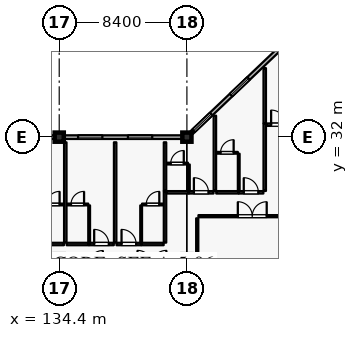
"""IFC4 building model, lengths in metres.
Left out: names, types, materials, properties, quantities, classifications, styles, units other than length and angle.
Written with IfcOpenShell. Run it as: python <this file> out.ifc"""

import sys

from ifc_helpers import new_model, si_unit, direction, frame, frame_2d, origin, origin_2d, place, context, subcontext, project, spatial, rectangle, extrude, element, fill, save


model = new_model("IFC4")
c1 = context("Model", 3, precision=1e-05, world=origin(), true_north=direction((0.0, 1.0)))
c2 = subcontext(c1, "Body", "Model", "MODEL_VIEW")
j1 = project(units=[si_unit("LENGTHUNIT", "METRE"), si_unit("PLANEANGLEUNIT", "RADIAN")], contexts=[c1])
p1 = place(None, origin())
s1 = spatial("IfcSite", under=j1, at=p1, CompositionType="ELEMENT")
p2 = place(p1, origin())
s2 = spatial("IfcBuilding", under=s1, at=p2, CompositionType="ELEMENT")
p3 = place(p2, frame((0.0, 0.0, 39.6)))
s3 = spatial("IfcBuildingStorey", under=s2, at=p3, CompositionType="ELEMENT", Elevation=39.6)
for number, where, z_axis, x_axis in (
    (1, (134.4, 32.0, 0.0), (0.0, 0.0, 1.0), (1.0, 0.0, 0.0)),
    (2, (142.8, 32.0, 0.0), (0.0, 0.0, 1.0), (1.0, 0.0, 0.0)),
    (3, (134.4, 24.0, 0.0), (0.0, 0.0, 1.0), (1.0, 0.0, 0.0)),
    (4, (142.8, 24.0, 0.0), (0.0, 0.0, 1.0), (1.0, 0.0, 0.0)),
):
    element("IfcColumn", number, at=place(p3, frame(where, z_axis=z_axis, x_axis=x_axis)), inside=s3, PredefinedType="COLUMN", context=c2, shape_type="SweptSolid", body=[
        extrude(rectangle(XDim=0.6, YDim=0.6, at=origin_2d()), origin(), (0.0, 0.0, 1.0), 3.6),
    ])
p4 = place(p3, frame((126.3, 32.0, 0.0), z_axis=(0.0, 0.0, 1.0), x_axis=(1.0, 0.0, 0.0)))
e5 = element("IfcWall", 5, at=p4, inside=s3, PredefinedType="SOLIDWALL", context=c2, shape_type="SweptSolid", body=[
    extrude(rectangle(XDim=7.8, YDim=0.24, at=frame_2d((3.9, 0.0))), origin(), (0.0, 0.0, 1.0), 2.89),
])
p5 = place(p4, frame((0.12, 0.0, 0.8)))
e6 = element("IfcOpeningElement", 6, at=p5, cuts=e5, PredefinedType="OPENING", context=c2, shape_type="SweptSolid", body=[
    extrude(rectangle(XDim=1.6, YDim=1.6, at=frame_2d((0.8, 0.8))), frame((0.0, 0.13, 0.0), z_axis=(0.0, -1.0, 0.0), x_axis=(1.0, 0.0, 0.0)), (0.0, 0.0, 1.0), 0.26),
])
p6 = place(p4, frame((2.78, 0.0, 0.8)))
e7 = element("IfcOpeningElement", 7, at=p6, cuts=e5, PredefinedType="OPENING", context=c2, shape_type="SweptSolid", body=[
    extrude(rectangle(XDim=1.6, YDim=1.6, at=frame_2d((0.8, 0.8))), frame((0.0, 0.13, 0.0), z_axis=(0.0, -1.0, 0.0), x_axis=(1.0, 0.0, 0.0)), (0.0, 0.0, 1.0), 0.26),
])
p7 = place(p4, frame((5.76, 0.0, 0.8)))
e8 = element("IfcOpeningElement", 8, at=p7, cuts=e5, PredefinedType="OPENING", context=c2, shape_type="SweptSolid", body=[
    extrude(rectangle(XDim=1.6, YDim=1.6, at=frame_2d((0.8, 0.8))), frame((0.0, 0.13, 0.0), z_axis=(0.0, -1.0, 0.0), x_axis=(1.0, 0.0, 0.0)), (0.0, 0.0, 1.0), 0.26),
])
p8 = place(p3, frame((134.7, 32.0, 0.0), z_axis=(0.0, 0.0, 1.0), x_axis=(1.0, 0.0, 0.0)))
e9 = element("IfcWall", 9, at=p8, inside=s3, PredefinedType="SOLIDWALL", context=c2, shape_type="SweptSolid", body=[
    extrude(rectangle(XDim=7.8, YDim=0.24, at=frame_2d((3.9, 0.0))), origin(), (0.0, 0.0, 1.0), 2.94),
])
p9 = place(p8, frame((0.94, 0.0, 0.8)))
e10 = element("IfcOpeningElement", 10, at=p9, cuts=e9, PredefinedType="OPENING", context=c2, shape_type="SweptSolid", body=[
    extrude(rectangle(XDim=1.6, YDim=1.6, at=frame_2d((0.8, 0.8))), frame((0.0, 0.13, 0.0), z_axis=(0.0, -1.0, 0.0), x_axis=(1.0, 0.0, 0.0)), (0.0, 0.0, 1.0), 0.26),
])
p10 = place(p8, frame((4.22, 0.0, 0.8)))
e11 = element("IfcOpeningElement", 11, at=p10, cuts=e9, PredefinedType="OPENING", context=c2, shape_type="SweptSolid", body=[
    extrude(rectangle(XDim=1.6, YDim=1.6, at=frame_2d((0.8, 0.8))), frame((0.0, 0.13, 0.0), z_axis=(0.0, -1.0, 0.0), x_axis=(1.0, 0.0, 0.0)), (0.0, 0.0, 1.0), 0.26),
])
p11 = place(p3, frame((143.1, 32.286, 0.0), z_axis=(0.0, 0.0, 1.0), x_axis=(0.724145477467, 0.689647248573, 0.0)))
e12 = element("IfcWall", 12, at=p11, inside=s3, PredefinedType="SOLIDWALL", context=c2, shape_type="SweptSolid", body=[
    extrude(rectangle(XDim=10.771, YDim=0.24, at=frame_2d((5.385, 0.0))), origin(), (0.0, 0.0, 1.0), 2.94),
])
p12 = place(p11, frame((0.194, 0.0, 0.8)))
e13 = element("IfcOpeningElement", 13, at=p12, cuts=e12, PredefinedType="OPENING", context=c2, shape_type="SweptSolid", body=[
    extrude(rectangle(XDim=1.6, YDim=1.6, at=frame_2d((0.8, 0.8))), frame((0.0, 0.13, 0.0), z_axis=(0.0, -1.0, 0.0), x_axis=(1.0, 0.0, 0.0)), (0.0, 0.0, 1.0), 0.26),
])
p13 = place(p11, frame((3.591, 0.0, 0.8)))
e14 = element("IfcOpeningElement", 14, at=p13, cuts=e12, PredefinedType="OPENING", context=c2, shape_type="SweptSolid", body=[
    extrude(rectangle(XDim=1.6, YDim=1.6, at=frame_2d((0.8, 0.8))), frame((0.0, 0.13, 0.0), z_axis=(0.0, -1.0, 0.0), x_axis=(1.0, 0.0, 0.0)), (0.0, 0.0, 1.0), 0.26),
])
p14 = place(p11, frame((7.983, 0.0, 0.8)))
e15 = element("IfcOpeningElement", 15, at=p14, cuts=e12, PredefinedType="OPENING", context=c2, shape_type="SweptSolid", body=[
    extrude(rectangle(XDim=1.6, YDim=1.6, at=frame_2d((0.8, 0.8))), frame((0.0, 0.13, 0.0), z_axis=(0.0, -1.0, 0.0), x_axis=(1.0, 0.0, 0.0)), (0.0, 0.0, 1.0), 0.26),
])
p15 = place(p3, frame((133.24, 24.97, 0.0), z_axis=(0.0, 0.0, 1.0), x_axis=(1.0, 0.0, 0.0)))
e16 = element("IfcWall", 16, at=p15, inside=s3, PredefinedType="PARTITIONING", context=c2, shape_type="SweptSolid", body=[
    extrude(rectangle(XDim=1.47, YDim=0.16, at=frame_2d((0.735, 0.0))), origin(), (0.0, 0.0, 1.0), 3.335),
])
p16 = place(p3, frame((133.29, 27.57, 0.0), z_axis=(0.0, 0.0, 1.0), x_axis=(1.0, 0.0, 0.0)))
e17 = element("IfcWall", 17, at=p16, inside=s3, PredefinedType="PARTITIONING", context=c2, shape_type="SweptSolid", body=[
    extrude(rectangle(XDim=1.41, YDim=0.115, at=frame_2d((0.705, 0.0))), origin(), (0.0, 0.0, 1.0), 3.335),
])
p17 = place(p16, frame((0.275, 0.0, 0.0)))
e18 = element("IfcOpeningElement", 18, at=p17, cuts=e17, PredefinedType="OPENING", context=c2, shape_type="SweptSolid", body=[
    extrude(rectangle(XDim=0.86, YDim=2.12, at=frame_2d((0.43, 1.06))), frame((0.0, 0.067, 0.0), z_axis=(0.0, -1.0, 0.0), x_axis=(1.0, 0.0, 0.0)), (0.0, 0.0, 1.0), 0.135),
])
p18 = place(p3, frame((134.89, 24.97, 0.0), z_axis=(0.0, 0.0, 1.0), x_axis=(1.0, 0.0, 0.0)))
e19 = element("IfcWall", 19, at=p18, inside=s3, PredefinedType="PARTITIONING", context=c2, shape_type="SweptSolid", body=[
    extrude(rectangle(XDim=1.47, YDim=0.16, at=frame_2d((0.735, 0.0))), origin(), (0.0, 0.0, 1.0), 3.335),
])
p19 = place(p3, frame((136.37, 24.97, 0.0), z_axis=(0.0, 0.0, 1.0), x_axis=(1.0, 0.0, 0.0)))
e20 = element("IfcWall", 20, at=p19, inside=s3, PredefinedType="PARTITIONING", context=c2, shape_type="SweptSolid", body=[
    extrude(rectangle(XDim=1.62, YDim=0.16, at=frame_2d((0.81, 0.0))), origin(), (0.0, 0.0, 1.0), 3.335),
])
p20 = place(p19, frame((0.33, 0.0, 0.0)))
e21 = element("IfcOpeningElement", 21, at=p20, cuts=e20, PredefinedType="OPENING", context=c2, shape_type="SweptSolid", body=[
    extrude(rectangle(XDim=0.96, YDim=2.2, at=frame_2d((0.48, 1.1))), frame((0.0, 0.09, 0.0), z_axis=(0.0, -1.0, 0.0), x_axis=(1.0, 0.0, 0.0)), (0.0, 0.0, 1.0), 0.18),
])
p21 = place(p3, frame((136.37, 25.06, 0.0), z_axis=(0.0, 0.0, 1.0), x_axis=(0.0, 1.0, 0.0)))
e22 = element("IfcWall", 22, at=p21, inside=s3, PredefinedType="PARTITIONING", context=c2, shape_type="SweptSolid", body=[
    extrude(rectangle(XDim=2.45, YDim=0.115, at=frame_2d((1.225, 0.0))), origin(), (0.0, 0.0, 1.0), 3.335),
])
p22 = place(p3, frame((134.9, 27.57, 0.0), z_axis=(0.0, 0.0, 1.0), x_axis=(1.0, 0.0, 0.0)))
e23 = element("IfcWall", 23, at=p22, inside=s3, PredefinedType="PARTITIONING", context=c2, shape_type="SweptSolid", body=[
    extrude(rectangle(XDim=1.41, YDim=0.115, at=frame_2d((0.705, 0.0))), origin(), (0.0, 0.0, 1.0), 3.335),
])
p23 = place(p22, frame((0.275, 0.0, 0.0)))
e24 = element("IfcOpeningElement", 24, at=p23, cuts=e23, PredefinedType="OPENING", context=c2, shape_type="SweptSolid", body=[
    extrude(rectangle(XDim=0.86, YDim=2.12, at=frame_2d((0.43, 1.06))), frame((0.0, 0.067, 0.0), z_axis=(0.0, -1.0, 0.0), x_axis=(1.0, 0.0, 0.0)), (0.0, 0.0, 1.0), 0.135),
])
p24 = place(p3, frame((134.8, 25.06, 0.0), z_axis=(0.0, 0.0, 1.0), x_axis=(0.0, 1.0, 0.0)))
e25 = element("IfcWall", 25, at=p24, inside=s3, PredefinedType="PARTITIONING", context=c2, shape_type="SweptSolid", body=[
    extrude(rectangle(XDim=6.6, YDim=0.16, at=frame_2d((3.3, 0.0))), origin(), (0.0, 0.0, 1.0), 3.335),
])
p25 = place(p3, frame((138.17, 24.97, 0.0), z_axis=(0.0, 0.0, 1.0), x_axis=(1.0, 0.0, 0.0)))
e26 = element("IfcWall", 26, at=p25, inside=s3, PredefinedType="PARTITIONING", context=c2, shape_type="SweptSolid", body=[
    extrude(rectangle(XDim=1.62, YDim=0.16, at=frame_2d((0.81, 0.0))), origin(), (0.0, 0.0, 1.0), 3.335),
])
p26 = place(p25, frame((0.33, 0.0, 0.0)))
e27 = element("IfcOpeningElement", 27, at=p26, cuts=e26, PredefinedType="OPENING", context=c2, shape_type="SweptSolid", body=[
    extrude(rectangle(XDim=0.96, YDim=2.2, at=frame_2d((0.48, 1.1))), frame((0.0, 0.09, 0.0), z_axis=(0.0, -1.0, 0.0), x_axis=(1.0, 0.0, 0.0)), (0.0, 0.0, 1.0), 0.18),
])
p27 = place(p3, frame((139.8, 24.97, 0.0), z_axis=(0.0, 0.0, 1.0), x_axis=(1.0, 0.0, 0.0)))
e28 = element("IfcWall", 28, at=p27, inside=s3, PredefinedType="PARTITIONING", context=c2, shape_type="SweptSolid", body=[
    extrude(rectangle(XDim=1.47, YDim=0.16, at=frame_2d((0.735, 0.0))), origin(), (0.0, 0.0, 1.0), 3.335),
])
p28 = place(p3, frame((139.79, 25.06, 0.0), z_axis=(0.0, 0.0, 1.0), x_axis=(0.0, 1.0, 0.0)))
e29 = element("IfcWall", 29, at=p28, inside=s3, PredefinedType="PARTITIONING", context=c2, shape_type="SweptSolid", body=[
    extrude(rectangle(XDim=2.45, YDim=0.115, at=frame_2d((1.225, 0.0))), origin(), (0.0, 0.0, 1.0), 3.335),
])
p29 = place(p3, frame((139.85, 27.57, 0.0), z_axis=(0.0, 0.0, 1.0), x_axis=(1.0, 0.0, 0.0)))
e30 = element("IfcWall", 30, at=p29, inside=s3, PredefinedType="PARTITIONING", context=c2, shape_type="SweptSolid", body=[
    extrude(rectangle(XDim=1.41, YDim=0.115, at=frame_2d((0.705, 0.0))), origin(), (0.0, 0.0, 1.0), 3.335),
])
p30 = place(p29, frame((0.275, 0.0, 0.0)))
e31 = element("IfcOpeningElement", 31, at=p30, cuts=e30, PredefinedType="OPENING", context=c2, shape_type="SweptSolid", body=[
    extrude(rectangle(XDim=0.86, YDim=2.12, at=frame_2d((0.43, 1.06))), frame((0.0, 0.067, 0.0), z_axis=(0.0, -1.0, 0.0), x_axis=(1.0, 0.0, 0.0)), (0.0, 0.0, 1.0), 0.135),
])
p31 = place(p3, frame((138.08, 25.06, 0.0), z_axis=(0.0, 0.0, 1.0), x_axis=(0.0, 1.0, 0.0)))
e32 = element("IfcWall", 32, at=p31, inside=s3, PredefinedType="PARTITIONING", context=c2, shape_type="SweptSolid", body=[
    extrude(rectangle(XDim=6.6, YDim=0.16, at=frame_2d((3.3, 0.0))), origin(), (0.0, 0.0, 1.0), 3.335),
])
p32 = place(p3, frame((141.36, 25.06, 0.0), z_axis=(0.0, 0.0, 1.0), x_axis=(0.0, 1.0, 0.0)))
e33 = element("IfcWall", 33, at=p32, inside=s3, PredefinedType="PARTITIONING", context=c2, shape_type="SweptSolid", body=[
    extrude(rectangle(XDim=3.39, YDim=0.16, at=frame_2d((1.695, 0.0))), origin(), (0.0, 0.0, 1.0), 3.335),
])
p33 = place(p3, frame((141.45, 28.37, 0.0), z_axis=(0.0, 0.0, 1.0), x_axis=(1.0, 0.0, 0.0)))
e34 = element("IfcWall", 34, at=p33, inside=s3, PredefinedType="PARTITIONING", context=c2, shape_type="SweptSolid", body=[
    extrude(rectangle(XDim=1.47, YDim=0.16, at=frame_2d((0.735, 0.0))), origin(), (0.0, 0.0, 1.0), 3.335),
])
p34 = place(p3, frame((142.93, 28.37, 0.0), z_axis=(0.0, 0.0, 1.0), x_axis=(1.0, 0.0, 0.0)))
e35 = element("IfcWall", 35, at=p34, inside=s3, PredefinedType="PARTITIONING", context=c2, shape_type="SweptSolid", body=[
    extrude(rectangle(XDim=1.62, YDim=0.16, at=frame_2d((0.81, 0.0))), origin(), (0.0, 0.0, 1.0), 3.335),
])
p35 = place(p34, frame((0.33, 0.0, 0.0)))
e36 = element("IfcOpeningElement", 36, at=p35, cuts=e35, PredefinedType="OPENING", context=c2, shape_type="SweptSolid", body=[
    extrude(rectangle(XDim=0.96, YDim=2.2, at=frame_2d((0.48, 1.1))), frame((0.0, 0.09, 0.0), z_axis=(0.0, -1.0, 0.0), x_axis=(1.0, 0.0, 0.0)), (0.0, 0.0, 1.0), 0.18),
])
p36 = place(p3, frame((142.93, 28.46, 0.0), z_axis=(0.0, 0.0, 1.0), x_axis=(0.0, 1.0, 0.0)))
e37 = element("IfcWall", 37, at=p36, inside=s3, PredefinedType="PARTITIONING", context=c2, shape_type="SweptSolid", body=[
    extrude(rectangle(XDim=1.74, YDim=0.115, at=frame_2d((0.87, 0.0))), origin(), (0.0, 0.0, 1.0), 2.74),
])
p37 = place(p3, frame((141.46, 30.26, 0.0), z_axis=(0.0, 0.0, 1.0), x_axis=(1.0, 0.0, 0.0)))
e38 = element("IfcWall", 38, at=p37, inside=s3, PredefinedType="PARTITIONING", context=c2, shape_type="SweptSolid", body=[
    extrude(rectangle(XDim=1.41, YDim=0.115, at=frame_2d((0.705, 0.0))), origin(), (0.0, 0.0, 1.0), 3.335),
])
p38 = place(p37, frame((0.275, 0.0, 0.0)))
e39 = element("IfcOpeningElement", 39, at=p38, cuts=e38, PredefinedType="OPENING", context=c2, shape_type="SweptSolid", body=[
    extrude(rectangle(XDim=0.86, YDim=2.12, at=frame_2d((0.43, 1.06))), frame((0.0, 0.067, 0.0), z_axis=(0.0, -1.0, 0.0), x_axis=(1.0, 0.0, 0.0)), (0.0, 0.0, 1.0), 0.135),
])
p39 = place(p3, frame((141.36, 28.46, 0.0), z_axis=(0.0, 0.0, 1.0), x_axis=(0.0, 1.0, 0.0)))
e40 = element("IfcWall", 40, at=p39, inside=s3, PredefinedType="PARTITIONING", context=c2, shape_type="SweptSolid", body=[
    extrude(rectangle(XDim=3.2, YDim=0.16, at=frame_2d((1.6, 0.0))), origin(), (0.0, 0.0, 1.0), 3.335),
])
p40 = place(p3, frame((144.73, 28.37, 0.0), z_axis=(0.0, 0.0, 1.0), x_axis=(1.0, 0.0, 0.0)))
e41 = element("IfcWall", 41, at=p40, inside=s3, PredefinedType="PARTITIONING", context=c2, shape_type="SweptSolid", body=[
    extrude(rectangle(XDim=1.47, YDim=0.16, at=frame_2d((0.735, 0.0))), origin(), (0.0, 0.0, 1.0), 3.335),
])
p41 = place(p3, frame((146.21, 28.37, 0.0), z_axis=(0.0, 0.0, 1.0), x_axis=(1.0, 0.0, 0.0)))
e42 = element("IfcWall", 42, at=p41, inside=s3, PredefinedType="PARTITIONING", context=c2, shape_type="SweptSolid", body=[
    extrude(rectangle(XDim=1.62, YDim=0.16, at=frame_2d((0.81, 0.0))), origin(), (0.0, 0.0, 1.0), 3.335),
])
p42 = place(p41, frame((0.33, 0.0, 0.0)))
e43 = element("IfcOpeningElement", 43, at=p42, cuts=e42, PredefinedType="OPENING", context=c2, shape_type="SweptSolid", body=[
    extrude(rectangle(XDim=0.96, YDim=2.2, at=frame_2d((0.48, 1.1))), frame((0.0, 0.09, 0.0), z_axis=(0.0, -1.0, 0.0), x_axis=(1.0, 0.0, 0.0)), (0.0, 0.0, 1.0), 0.18),
])
p43 = place(p3, frame((146.21, 28.46, 0.0), z_axis=(0.0, 0.0, 1.0), x_axis=(0.0, 1.0, 0.0)))
e44 = element("IfcWall", 44, at=p43, inside=s3, PredefinedType="PARTITIONING", context=c2, shape_type="SweptSolid", body=[
    extrude(rectangle(XDim=2.45, YDim=0.115, at=frame_2d((1.225, 0.0))), origin(), (0.0, 0.0, 1.0), 3.335),
])
p44 = place(p3, frame((144.74, 30.97, 0.0), z_axis=(0.0, 0.0, 1.0), x_axis=(1.0, 0.0, 0.0)))
e45 = element("IfcWall", 45, at=p44, inside=s3, PredefinedType="PARTITIONING", context=c2, shape_type="SweptSolid", body=[
    extrude(rectangle(XDim=1.41, YDim=0.115, at=frame_2d((0.705, 0.0))), origin(), (0.0, 0.0, 1.0), 3.335),
])
p45 = place(p44, frame((0.275, 0.0, 0.0)))
e46 = element("IfcOpeningElement", 46, at=p45, cuts=e45, PredefinedType="OPENING", context=c2, shape_type="SweptSolid", body=[
    extrude(rectangle(XDim=0.86, YDim=2.12, at=frame_2d((0.43, 1.06))), frame((0.0, 0.067, 0.0), z_axis=(0.0, -1.0, 0.0), x_axis=(1.0, 0.0, 0.0)), (0.0, 0.0, 1.0), 0.135),
])
p46 = place(p3, frame((144.64, 28.46, 0.0), z_axis=(0.0, 0.0, 1.0), x_axis=(0.0, 1.0, 0.0)))
e47 = element("IfcWall", 47, at=p46, inside=s3, PredefinedType="PARTITIONING", context=c2, shape_type="SweptSolid", body=[
    extrude(rectangle(XDim=4.95, YDim=0.16, at=frame_2d((2.475, 0.0))), origin(), (0.0, 0.0, 1.0), 3.335),
])
p47 = place(p3, frame((147.92, 28.46, 0.0), z_axis=(0.0, 0.0, 1.0), x_axis=(0.0, 1.0, 0.0)))
e48 = element("IfcWall", 48, at=p47, inside=s3, PredefinedType="PARTITIONING", context=c2, shape_type="SweptSolid", body=[
    extrude(rectangle(XDim=4.44, YDim=0.16, at=frame_2d((2.22, 0.0))), origin(), (0.0, 0.0, 1.0), 3.335),
])
p48 = place(p3, frame((148.01, 32.82, 0.0), z_axis=(0.0, 0.0, 1.0), x_axis=(1.0, 0.0, 0.0)))
e49 = element("IfcWall", 49, at=p48, inside=s3, PredefinedType="PARTITIONING", context=c2, shape_type="SweptSolid", body=[
    extrude(rectangle(XDim=1.62, YDim=0.16, at=frame_2d((0.81, 0.0))), origin(), (0.0, 0.0, 1.0), 3.335),
])
p49 = place(p48, frame((0.33, 0.0, 0.0)))
e50 = element("IfcOpeningElement", 50, at=p49, cuts=e49, PredefinedType="OPENING", context=c2, shape_type="SweptSolid", body=[
    extrude(rectangle(XDim=0.96, YDim=2.2, at=frame_2d((0.48, 1.1))), frame((0.0, 0.09, 0.0), z_axis=(0.0, -1.0, 0.0), x_axis=(1.0, 0.0, 0.0)), (0.0, 0.0, 1.0), 0.18),
])
p50 = place(p3, frame((147.92, 32.91, 0.0), z_axis=(0.0, 0.0, 1.0), x_axis=(0.0, 1.0, 0.0)))
e51 = element("IfcWall", 51, at=p50, inside=s3, PredefinedType="PARTITIONING", context=c2, shape_type="SweptSolid", body=[
    extrude(rectangle(XDim=3.63, YDim=0.16, at=frame_2d((1.815, 0.0))), origin(), (0.0, 0.0, 1.0), 3.335),
])
p51 = place(p3, frame((143.56, 26.8, 0.0), z_axis=(0.0, 0.0, 1.0), x_axis=(1.0, 0.0, 0.0)))
e52 = element("IfcWall", 52, at=p51, inside=s3, PredefinedType="PARTITIONING", context=c2, shape_type="SweptSolid", body=[
    extrude(rectangle(XDim=7.08, YDim=0.14, at=frame_2d((3.54, 0.0))), origin(), (0.0, 0.0, 1.0), 3.335),
])
p52 = place(p51, frame((2.59, 0.0, 0.0)))
e53 = element("IfcOpeningElement", 53, at=p52, cuts=e52, PredefinedType="OPENING", context=c2, shape_type="SweptSolid", body=[
    extrude(rectangle(XDim=1.9, YDim=2.4, at=frame_2d((0.95, 1.2))), frame((0.0, 0.08, 0.0), z_axis=(0.0, -1.0, 0.0), x_axis=(1.0, 0.0, 0.0)), (0.0, 0.0, 1.0), 0.16),
])
p53 = place(p3, frame((143.48, 23.45, 0.0), z_axis=(0.0, 0.0, 1.0), x_axis=(0.0, 1.0, 0.0)))
e54 = element("IfcWall", 54, at=p53, inside=s3, PredefinedType="PARTITIONING", context=c2, shape_type="SweptSolid", body=[
    extrude(rectangle(XDim=3.21, YDim=0.14, at=frame_2d((1.605, 0.0))), origin(), (0.0, 0.0, 1.0), 3.335),
])
p54 = place(p9, origin())
e55 = element("IfcWindow", 55, at=p54, inside=s3, PartitioningType="SINGLE_PANEL", PredefinedType="WINDOW", context=c2, shape_type="SweptSolid", body=[
    extrude(rectangle(XDim=1.6, YDim=1.6, at=frame_2d((0.8, 0.8))), frame((0.0, 0.03, 0.0), z_axis=(0.0, -1.0, 0.0), x_axis=(1.0, 0.0, 0.0)), (0.0, 0.0, 1.0), 0.06),
])
fill(e10, e55)
p55 = place(p10, origin())
e56 = element("IfcWindow", 56, at=p55, inside=s3, PartitioningType="SINGLE_PANEL", PredefinedType="WINDOW", context=c2, shape_type="SweptSolid", body=[
    extrude(rectangle(XDim=1.6, YDim=1.6, at=frame_2d((0.8, 0.8))), frame((0.0, 0.03, 0.0), z_axis=(0.0, -1.0, 0.0), x_axis=(1.0, 0.0, 0.0)), (0.0, 0.0, 1.0), 0.06),
])
fill(e11, e56)
p56 = place(p12, origin())
e57 = element("IfcWindow", 57, at=p56, inside=s3, PartitioningType="SINGLE_PANEL", PredefinedType="WINDOW", context=c2, shape_type="SweptSolid", body=[
    extrude(rectangle(XDim=1.6, YDim=1.6, at=frame_2d((0.8, 0.8))), frame((0.0, 0.03, 0.0), z_axis=(0.0, -1.0, 0.0), x_axis=(1.0, 0.0, 0.0)), (0.0, 0.0, 1.0), 0.06),
])
fill(e13, e57)
p57 = place(p13, origin())
e58 = element("IfcWindow", 58, at=p57, inside=s3, PartitioningType="SINGLE_PANEL", PredefinedType="WINDOW", context=c2, shape_type="SweptSolid", body=[
    extrude(rectangle(XDim=1.6, YDim=1.6, at=frame_2d((0.8, 0.8))), frame((0.0, 0.03, 0.0), z_axis=(0.0, -1.0, 0.0), x_axis=(1.0, 0.0, 0.0)), (0.0, 0.0, 1.0), 0.06),
])
fill(e14, e58)
p58 = place(p17, origin())
e59 = element("IfcDoor", 59, at=p58, inside=s3, OperationType="SINGLE_SWING_RIGHT", PredefinedType="DOOR", context=c2, shape_type="SweptSolid", body=[
    extrude(rectangle(XDim=0.86, YDim=2.12, at=frame_2d((0.43, 1.06))), frame((0.0, 0.025, 0.0), z_axis=(0.0, -1.0, 0.0), x_axis=(1.0, 0.0, 0.0)), (0.0, 0.0, 1.0), 0.05),
])
fill(e18, e59)
p59 = place(p20, origin())
e60 = element("IfcDoor", 60, at=p59, inside=s3, OperationType="SINGLE_SWING_LEFT", PredefinedType="DOOR", context=c2, shape_type="SweptSolid", body=[
    extrude(rectangle(XDim=0.96, YDim=2.2, at=frame_2d((0.48, 1.1))), frame((0.0, 0.025, 0.0), z_axis=(0.0, -1.0, 0.0), x_axis=(1.0, 0.0, 0.0)), (0.0, 0.0, 1.0), 0.05),
])
fill(e21, e60)
p60 = place(p23, origin())
e61 = element("IfcDoor", 61, at=p60, inside=s3, OperationType="SINGLE_SWING_RIGHT", PredefinedType="DOOR", context=c2, shape_type="SweptSolid", body=[
    extrude(rectangle(XDim=0.86, YDim=2.12, at=frame_2d((0.43, 1.06))), frame((0.0, 0.025, 0.0), z_axis=(0.0, -1.0, 0.0), x_axis=(1.0, 0.0, 0.0)), (0.0, 0.0, 1.0), 0.05),
])
fill(e24, e61)
p61 = place(p26, origin())
e62 = element("IfcDoor", 62, at=p61, inside=s3, OperationType="SINGLE_SWING_LEFT", PredefinedType="DOOR", context=c2, shape_type="SweptSolid", body=[
    extrude(rectangle(XDim=0.96, YDim=2.2, at=frame_2d((0.48, 1.1))), frame((0.0, 0.025, 0.0), z_axis=(0.0, -1.0, 0.0), x_axis=(1.0, 0.0, 0.0)), (0.0, 0.0, 1.0), 0.05),
])
fill(e27, e62)
p62 = place(p30, origin())
e63 = element("IfcDoor", 63, at=p62, inside=s3, OperationType="SINGLE_SWING_RIGHT", PredefinedType="DOOR", context=c2, shape_type="SweptSolid", body=[
    extrude(rectangle(XDim=0.86, YDim=2.12, at=frame_2d((0.43, 1.06))), frame((0.0, 0.025, 0.0), z_axis=(0.0, -1.0, 0.0), x_axis=(1.0, 0.0, 0.0)), (0.0, 0.0, 1.0), 0.05),
])
fill(e31, e63)
p63 = place(p35, origin())
e64 = element("IfcDoor", 64, at=p63, inside=s3, OperationType="SINGLE_SWING_LEFT", PredefinedType="DOOR", context=c2, shape_type="SweptSolid", body=[
    extrude(rectangle(XDim=0.96, YDim=2.2, at=frame_2d((0.48, 1.1))), frame((0.0, 0.025, 0.0), z_axis=(0.0, -1.0, 0.0), x_axis=(1.0, 0.0, 0.0)), (0.0, 0.0, 1.0), 0.05),
])
fill(e36, e64)
p64 = place(p38, origin())
e65 = element("IfcDoor", 65, at=p64, inside=s3, OperationType="SINGLE_SWING_RIGHT", PredefinedType="DOOR", context=c2, shape_type="SweptSolid", body=[
    extrude(rectangle(XDim=0.86, YDim=2.12, at=frame_2d((0.43, 1.06))), frame((0.0, 0.025, 0.0), z_axis=(0.0, -1.0, 0.0), x_axis=(1.0, 0.0, 0.0)), (0.0, 0.0, 1.0), 0.05),
])
fill(e39, e65)
p65 = place(p42, origin())
e66 = element("IfcDoor", 66, at=p65, inside=s3, OperationType="SINGLE_SWING_LEFT", PredefinedType="DOOR", context=c2, shape_type="SweptSolid", body=[
    extrude(rectangle(XDim=0.96, YDim=2.2, at=frame_2d((0.48, 1.1))), frame((0.0, 0.025, 0.0), z_axis=(0.0, -1.0, 0.0), x_axis=(1.0, 0.0, 0.0)), (0.0, 0.0, 1.0), 0.05),
])
fill(e43, e66)
p66 = place(p45, origin())
e67 = element("IfcDoor", 67, at=p66, inside=s3, OperationType="SINGLE_SWING_RIGHT", PredefinedType="DOOR", context=c2, shape_type="SweptSolid", body=[
    extrude(rectangle(XDim=0.86, YDim=2.12, at=frame_2d((0.43, 1.06))), frame((0.0, 0.025, 0.0), z_axis=(0.0, -1.0, 0.0), x_axis=(1.0, 0.0, 0.0)), (0.0, 0.0, 1.0), 0.05),
])
fill(e46, e67)
p67 = place(p49, origin())
e68 = element("IfcDoor", 68, at=p67, inside=s3, OperationType="SINGLE_SWING_LEFT", PredefinedType="DOOR", context=c2, shape_type="SweptSolid", body=[
    extrude(rectangle(XDim=0.96, YDim=2.2, at=frame_2d((0.48, 1.1))), frame((0.0, 0.025, 0.0), z_axis=(0.0, -1.0, 0.0), x_axis=(1.0, 0.0, 0.0)), (0.0, 0.0, 1.0), 0.05),
])
fill(e50, e68)
p68 = place(p52, origin())
e69 = element("IfcDoor", 69, at=p68, inside=s3, OperationType="DOUBLE_DOOR_SINGLE_SWING", PredefinedType="DOOR", context=c2, shape_type="SweptSolid", body=[
    extrude(rectangle(XDim=1.9, YDim=2.4, at=frame_2d((0.95, 1.2))), frame((0.0, 0.025, 0.0), z_axis=(0.0, -1.0, 0.0), x_axis=(1.0, 0.0, 0.0)), (0.0, 0.0, 1.0), 0.05),
])
fill(e53, e69)
save(model, sys.argv[1])
